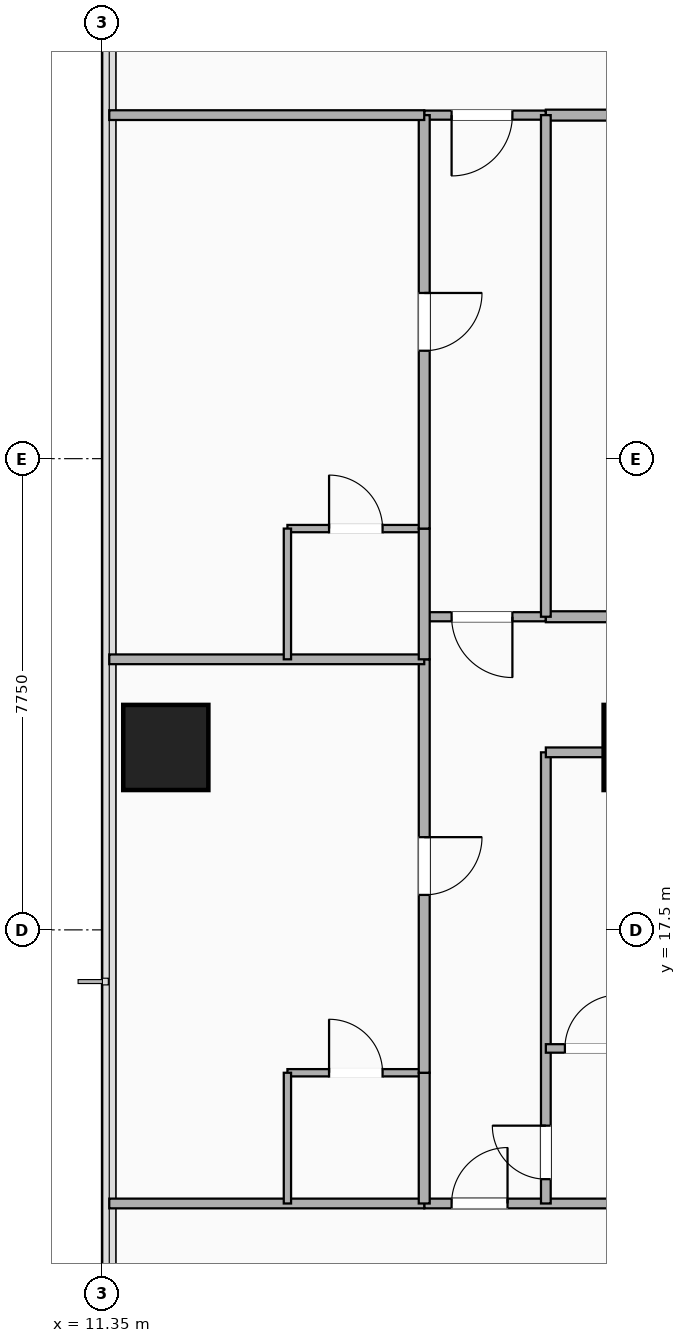
"""IFC4 building model, lengths in metres.
Left out: names, types, materials, properties, quantities, classifications, styles, units other than length and angle.
Written with IfcOpenShell. Run it as: python <this file> out.ifc"""

import sys

from ifc_helpers import new_model, si_unit, direction, frame, frame_2d, origin, origin_2d, place, context, subcontext, project, spatial, rectangle, extrude, element, fill, save


model = new_model("IFC4")
c1 = context("Model", 3, precision=1e-05, world=origin(), true_north=direction((0.0, 1.0)))
c2 = subcontext(c1, "Body", "Model", "MODEL_VIEW")
j1 = project(units=[si_unit("LENGTHUNIT", "METRE"), si_unit("PLANEANGLEUNIT", "RADIAN")], contexts=[c1])
p1 = place(None, origin())
s1 = spatial("IfcSite", under=j1, at=p1, CompositionType="ELEMENT")
p2 = place(p1, origin())
s2 = spatial("IfcBuilding", under=s1, at=p2, CompositionType="ELEMENT")
p3 = place(p2, frame((0.0, 0.0, 50.9)))
s3 = spatial("IfcBuildingStorey", under=s2, at=p3, CompositionType="ELEMENT", Elevation=50.9)
for number, where, z_axis, x_axis in (
    (1, (20.3, 20.5, -0.28), (0.0, 0.0, 1.0), (1.0, 0.0, 0.0)),
    (2, (12.4, 20.5, -0.28), (0.0, 0.0, 1.0), (1.0, 0.0, 0.0)),
):
    element("IfcColumn", number, at=place(p3, frame(where, z_axis=z_axis, x_axis=x_axis)), inside=s3, PredefinedType="COLUMN", context=c2, shape_type="SweptSolid", body=[
        extrude(rectangle(XDim=1.4, YDim=1.4, at=origin_2d()), origin(), (0.0, 0.0, 1.0), 3.5),
    ])
p4 = place(p3, frame((16.65, 13.0, 0.0), z_axis=(0.0, 0.0, 1.0), x_axis=(1.0, 0.0, 0.0)))
e3 = element("IfcWall", 3, at=p4, inside=s3, PredefinedType="PARTITIONING", context=c2, shape_type="SweptSolid", body=[
    extrude(rectangle(XDim=3.65, YDim=0.16, at=frame_2d((1.825, 0.0))), origin(), (0.0, 0.0, 1.0), 2.51),
])
p5 = place(p4, frame((1.37, 0.0, 0.0), z_axis=(0.0, 0.0, 1.0), x_axis=(-1.0, 0.0, 0.0)))
e4 = element("IfcOpeningElement", 4, at=p5, cuts=e3, PredefinedType="OPENING", context=c2, shape_type="SweptSolid", body=[
    extrude(rectangle(XDim=0.92, YDim=2.08, at=frame_2d((0.46, 1.04))), frame((0.0, 0.09, 0.0), z_axis=(0.0, -1.0, 0.0), x_axis=(1.0, 0.0, 0.0)), (0.0, 0.0, 1.0), 0.18),
])
p6 = place(p3, frame((18.65, 13.0, 0.0), z_axis=(0.0, 0.0, 1.0), x_axis=(0.0, 1.0, 0.0)))
e5 = element("IfcWall", 5, at=p6, inside=s3, PredefinedType="PARTITIONING", context=c2, shape_type="SweptSolid", body=[
    extrude(rectangle(XDim=7.42, YDim=0.16, at=frame_2d((3.71, 0.0))), origin(), (0.0, 0.0, 1.0), 2.51),
])
p7 = place(p6, frame((1.28, 0.0, 0.0), z_axis=(0.0, 0.0, 1.0), x_axis=(-1.0, 0.0, 0.0)))
e6 = element("IfcOpeningElement", 6, at=p7, cuts=e5, PredefinedType="OPENING", context=c2, shape_type="SweptSolid", body=[
    extrude(rectangle(XDim=0.88, YDim=2.08, at=frame_2d((0.44, 1.04))), frame((0.0, 0.09, 0.0), z_axis=(0.0, -1.0, 0.0), x_axis=(1.0, 0.0, 0.0)), (0.0, 0.0, 1.0), 0.18),
])
p8 = place(p3, frame((18.65, 20.42, 0.0), z_axis=(0.0, 0.0, 1.0), x_axis=(1.0, 0.0, 0.0)))
e7 = element("IfcWall", 7, at=p8, inside=s3, PredefinedType="PARTITIONING", context=c2, shape_type="SweptSolid", body=[
    extrude(rectangle(XDim=1.65, YDim=0.16, at=frame_2d((0.825, 0.0))), origin(), (0.0, 0.0, 1.0), 2.51),
])
p9 = place(p3, frame((16.65, 22.65, 0.0), z_axis=(0.0, 0.0, 1.0), x_axis=(1.0, 0.0, 0.0)))
e8 = element("IfcWall", 8, at=p9, inside=s3, PredefinedType="PARTITIONING", context=c2, shape_type="SweptSolid", body=[
    extrude(rectangle(XDim=2.0, YDim=0.15, at=frame_2d((1.0, 0.0))), origin(), (0.0, 0.0, 1.0), 3.22),
])
p10 = place(p9, frame((0.45, 0.0, 0.0)))
e9 = element("IfcOpeningElement", 9, at=p10, cuts=e8, PredefinedType="OPENING", context=c2, shape_type="SweptSolid", body=[
    extrude(rectangle(XDim=1.0, YDim=2.15, at=frame_2d((0.5, 1.075))), frame((0.0, 0.085, 0.0), z_axis=(0.0, -1.0, 0.0), x_axis=(1.0, 0.0, 0.0)), (0.0, 0.0, 1.0), 0.17),
])
p11 = place(p3, frame((16.65, 30.9, 0.0), z_axis=(0.0, 0.0, 1.0), x_axis=(1.0, 0.0, 0.0)))
e10 = element("IfcWall", 10, at=p11, inside=s3, PredefinedType="PARTITIONING", context=c2, shape_type="SweptSolid", body=[
    extrude(rectangle(XDim=2.0, YDim=0.15, at=frame_2d((1.0, 0.0))), origin(), (0.0, 0.0, 1.0), 3.22),
])
p12 = place(p11, frame((0.45, 0.0, 0.0)))
e11 = element("IfcOpeningElement", 11, at=p12, cuts=e10, PredefinedType="OPENING", context=c2, shape_type="SweptSolid", body=[
    extrude(rectangle(XDim=1.0, YDim=2.15, at=frame_2d((0.5, 1.075))), frame((0.0, 0.085, 0.0), z_axis=(0.0, -1.0, 0.0), x_axis=(1.0, 0.0, 0.0)), (0.0, 0.0, 1.0), 0.17),
])
p13 = place(p3, frame((18.65, 22.65, 0.0), z_axis=(0.0, 0.0, 1.0), x_axis=(1.0, 0.0, 0.0)))
e12 = element("IfcWall", 12, at=p13, inside=s3, PredefinedType="PARTITIONING", context=c2, shape_type="SweptSolid", body=[
    extrude(rectangle(XDim=10.55, YDim=0.18, at=frame_2d((5.275, 0.0))), origin(), (0.0, 0.0, 1.0), 2.51),
])
p14 = place(p13, frame((4.8, 0.0, 0.0)))
e13 = element("IfcOpeningElement", 13, at=p14, cuts=e12, PredefinedType="OPENING", context=c2, shape_type="SweptSolid", body=[
    extrude(rectangle(XDim=0.95, YDim=2.15, at=frame_2d((0.475, 1.075))), frame((0.0, 0.1, 0.0), z_axis=(0.0, -1.0, 0.0), x_axis=(1.0, 0.0, 0.0)), (0.0, 0.0, 1.0), 0.2),
])
p15 = place(p3, frame((18.65, 30.9, 0.0), z_axis=(0.0, 0.0, 1.0), x_axis=(1.0, 0.0, 0.0)))
e14 = element("IfcWall", 14, at=p15, inside=s3, PredefinedType="PARTITIONING", context=c2, shape_type="SweptSolid", body=[
    extrude(rectangle(XDim=10.55, YDim=0.18, at=frame_2d((5.275, 0.0))), origin(), (0.0, 0.0, 1.0), 2.51),
])
p16 = place(p3, frame((18.65, 22.65, 0.0), z_axis=(0.0, 0.0, 1.0), x_axis=(0.0, 1.0, 0.0)))
e15 = element("IfcWall", 15, at=p16, inside=s3, PredefinedType="PARTITIONING", context=c2, shape_type="SweptSolid", body=[
    extrude(rectangle(XDim=8.25, YDim=0.16, at=frame_2d((4.125, 0.0))), origin(), (0.0, 0.0, 1.0), 2.788),
])
p17 = place(p3, frame((11.47, 13.0, 0.0), z_axis=(0.0, 0.0, 1.0), x_axis=(1.0, 0.0, 0.0)))
e16 = element("IfcWall", 16, at=p17, inside=s3, PredefinedType="PARTITIONING", context=c2, shape_type="SweptSolid", body=[
    extrude(rectangle(XDim=5.18, YDim=0.16, at=frame_2d((2.59, 0.0))), origin(), (0.0, 0.0, 1.0), 2.583),
])
p18 = place(p3, frame((14.4, 15.15, 0.0), z_axis=(0.0, 0.0, 1.0), x_axis=(1.0, 0.0, 0.0)))
e17 = element("IfcWall", 17, at=p18, inside=s3, PredefinedType="PARTITIONING", context=c2, shape_type="SweptSolid", body=[
    extrude(rectangle(XDim=2.25, YDim=0.12, at=frame_2d((1.125, 0.0))), origin(), (0.0, 0.0, 1.0), 3.22),
])
p19 = place(p18, frame((1.565, 0.0, 0.0), z_axis=(0.0, 0.0, 1.0), x_axis=(-1.0, 0.0, 0.0)))
e18 = element("IfcOpeningElement", 18, at=p19, cuts=e17, PredefinedType="OPENING", context=c2, shape_type="SweptSolid", body=[
    extrude(rectangle(XDim=0.88, YDim=2.08, at=frame_2d((0.44, 1.04))), frame((0.0, 0.07, 0.0), z_axis=(0.0, -1.0, 0.0), x_axis=(1.0, 0.0, 0.0)), (0.0, 0.0, 1.0), 0.14),
])
p20 = place(p3, frame((14.4, 13.0, 0.0), z_axis=(0.0, 0.0, 1.0), x_axis=(0.0, 1.0, 0.0)))
e19 = element("IfcWall", 19, at=p20, inside=s3, PredefinedType="PARTITIONING", context=c2, shape_type="SweptSolid", body=[
    extrude(rectangle(XDim=2.15, YDim=0.12, at=frame_2d((1.075, 0.0))), origin(), (0.0, 0.0, 1.0), 2.902),
])
p21 = place(p3, frame((16.65, 13.0, 0.0), z_axis=(0.0, 0.0, 1.0), x_axis=(0.0, 1.0, 0.0)))
e20 = element("IfcWall", 20, at=p21, inside=s3, PredefinedType="PARTITIONING", context=c2, shape_type="SweptSolid", body=[
    extrude(rectangle(XDim=2.15, YDim=0.18, at=frame_2d((1.075, 0.0))), origin(), (0.0, 0.0, 1.0), 2.902),
])
p22 = place(p3, frame((16.65, 15.15, 0.0), z_axis=(0.0, 0.0, 1.0), x_axis=(0.0, 1.0, 0.0)))
e21 = element("IfcWall", 21, at=p22, inside=s3, PredefinedType="PARTITIONING", context=c2, shape_type="SweptSolid", body=[
    extrude(rectangle(XDim=6.8, YDim=0.18, at=frame_2d((3.4, 0.0))), origin(), (0.0, 0.0, 1.0), 2.51),
])
p23 = place(p22, frame((2.925, 0.0, 0.0)))
e22 = element("IfcOpeningElement", 22, at=p23, cuts=e21, PredefinedType="OPENING", context=c2, shape_type="SweptSolid", body=[
    extrude(rectangle(XDim=0.95, YDim=2.15, at=frame_2d((0.475, 1.075))), frame((0.0, 0.1, 0.0), z_axis=(0.0, -1.0, 0.0), x_axis=(1.0, 0.0, 0.0)), (0.0, 0.0, 1.0), 0.2),
])
p24 = place(p3, frame((11.47, 21.95, 0.0), z_axis=(0.0, 0.0, 1.0), x_axis=(1.0, 0.0, 0.0)))
e23 = element("IfcWall", 23, at=p24, inside=s3, PredefinedType="PARTITIONING", context=c2, shape_type="SweptSolid", body=[
    extrude(rectangle(XDim=5.18, YDim=0.16, at=frame_2d((2.59, 0.0))), origin(), (0.0, 0.0, 1.0), 2.583),
])
p25 = place(p3, frame((14.4, 24.1, 0.0), z_axis=(0.0, 0.0, 1.0), x_axis=(1.0, 0.0, 0.0)))
e24 = element("IfcWall", 24, at=p25, inside=s3, PredefinedType="PARTITIONING", context=c2, shape_type="SweptSolid", body=[
    extrude(rectangle(XDim=2.25, YDim=0.12, at=frame_2d((1.125, 0.0))), origin(), (0.0, 0.0, 1.0), 3.22),
])
p26 = place(p25, frame((1.565, 0.0, 0.0), z_axis=(0.0, 0.0, 1.0), x_axis=(-1.0, 0.0, 0.0)))
e25 = element("IfcOpeningElement", 25, at=p26, cuts=e24, PredefinedType="OPENING", context=c2, shape_type="SweptSolid", body=[
    extrude(rectangle(XDim=0.88, YDim=2.08, at=frame_2d((0.44, 1.04))), frame((0.0, 0.07, 0.0), z_axis=(0.0, -1.0, 0.0), x_axis=(1.0, 0.0, 0.0)), (0.0, 0.0, 1.0), 0.14),
])
p27 = place(p3, frame((14.4, 21.95, 0.0), z_axis=(0.0, 0.0, 1.0), x_axis=(0.0, 1.0, 0.0)))
e26 = element("IfcWall", 26, at=p27, inside=s3, PredefinedType="PARTITIONING", context=c2, shape_type="SweptSolid", body=[
    extrude(rectangle(XDim=2.15, YDim=0.12, at=frame_2d((1.075, 0.0))), origin(), (0.0, 0.0, 1.0), 3.22),
])
p28 = place(p3, frame((16.65, 21.95, 0.0), z_axis=(0.0, 0.0, 1.0), x_axis=(0.0, 1.0, 0.0)))
e27 = element("IfcWall", 27, at=p28, inside=s3, PredefinedType="PARTITIONING", context=c2, shape_type="SweptSolid", body=[
    extrude(rectangle(XDim=2.15, YDim=0.18, at=frame_2d((1.075, 0.0))), origin(), (0.0, 0.0, 1.0), 3.22),
])
p29 = place(p3, frame((16.65, 24.1, 0.0), z_axis=(0.0, 0.0, 1.0), x_axis=(0.0, 1.0, 0.0)))
e28 = element("IfcWall", 28, at=p29, inside=s3, PredefinedType="PARTITIONING", context=c2, shape_type="SweptSolid", body=[
    extrude(rectangle(XDim=6.8, YDim=0.18, at=frame_2d((3.4, 0.0))), origin(), (0.0, 0.0, 1.0), 2.788),
])
p30 = place(p29, frame((2.925, 0.0, 0.0)))
e29 = element("IfcOpeningElement", 29, at=p30, cuts=e28, PredefinedType="OPENING", context=c2, shape_type="SweptSolid", body=[
    extrude(rectangle(XDim=0.95, YDim=2.15, at=frame_2d((0.475, 1.075))), frame((0.0, 0.1, 0.0), z_axis=(0.0, -1.0, 0.0), x_axis=(1.0, 0.0, 0.0)), (0.0, 0.0, 1.0), 0.2),
])
p31 = place(p3, frame((11.47, 30.9, 0.0), z_axis=(0.0, 0.0, 1.0), x_axis=(1.0, 0.0, 0.0)))
e30 = element("IfcWall", 30, at=p31, inside=s3, PredefinedType="PARTITIONING", context=c2, shape_type="SweptSolid", body=[
    extrude(rectangle(XDim=5.18, YDim=0.16, at=frame_2d((2.59, 0.0))), origin(), (0.0, 0.0, 1.0), 2.583),
])
p32 = place(p3, frame((18.65, 15.55, 0.0), z_axis=(0.0, 0.0, 1.0), x_axis=(1.0, 0.0, 0.0)))
e31 = element("IfcWall", 31, at=p32, inside=s3, PredefinedType="PARTITIONING", context=c2, shape_type="SweptSolid", body=[
    extrude(rectangle(XDim=1.6, YDim=0.14, at=frame_2d((0.8, 0.0))), origin(), (0.0, 0.0, 1.0), 2.51),
])
p33 = place(p32, frame((1.193, 0.0, 0.0), z_axis=(0.0, 0.0, 1.0), x_axis=(-1.0, 0.0, 0.0)))
e32 = element("IfcOpeningElement", 32, at=p33, cuts=e31, PredefinedType="OPENING", context=c2, shape_type="SweptSolid", body=[
    extrude(rectangle(XDim=0.88, YDim=2.08, at=frame_2d((0.44, 1.04))), frame((0.0, 0.08, 0.0), z_axis=(0.0, -1.0, 0.0), x_axis=(1.0, 0.0, 0.0)), (0.0, 0.0, 1.0), 0.16),
])
p34 = place(p5, origin())
e33 = element("IfcDoor", 33, at=p34, inside=s3, OperationType="SINGLE_SWING_RIGHT", PredefinedType="DOOR", context=c2, shape_type="SweptSolid", body=[
    extrude(rectangle(XDim=0.92, YDim=2.08, at=frame_2d((0.46, 1.04))), frame((0.0, 0.025, 0.0), z_axis=(0.0, -1.0, 0.0), x_axis=(1.0, 0.0, 0.0)), (0.0, 0.0, 1.0), 0.05),
])
fill(e4, e33)
p35 = place(p7, origin())
e34 = element("IfcDoor", 34, at=p35, inside=s3, OperationType="SINGLE_SWING_RIGHT", PredefinedType="DOOR", context=c2, shape_type="SweptSolid", body=[
    extrude(rectangle(XDim=0.88, YDim=2.08, at=frame_2d((0.44, 1.04))), frame((0.0, 0.025, 0.0), z_axis=(0.0, -1.0, 0.0), x_axis=(1.0, 0.0, 0.0)), (0.0, 0.0, 1.0), 0.05),
])
fill(e6, e34)
p36 = place(p10, origin())
e35 = element("IfcDoor", 35, at=p36, inside=s3, OperationType="SINGLE_SWING_RIGHT", PredefinedType="DOOR", context=c2, shape_type="SweptSolid", body=[
    extrude(rectangle(XDim=1.0, YDim=2.15, at=frame_2d((0.5, 1.075))), frame((0.0, 0.025, 0.0), z_axis=(0.0, -1.0, 0.0), x_axis=(1.0, 0.0, 0.0)), (0.0, 0.0, 1.0), 0.05),
])
fill(e9, e35)
p37 = place(p12, origin())
e36 = element("IfcDoor", 36, at=p37, inside=s3, OperationType="SINGLE_SWING_LEFT", PredefinedType="DOOR", context=c2, shape_type="SweptSolid", body=[
    extrude(rectangle(XDim=1.0, YDim=2.15, at=frame_2d((0.5, 1.075))), frame((0.0, 0.025, 0.0), z_axis=(0.0, -1.0, 0.0), x_axis=(1.0, 0.0, 0.0)), (0.0, 0.0, 1.0), 0.05),
])
fill(e11, e36)
p38 = place(p19, origin())
e37 = element("IfcDoor", 37, at=p38, inside=s3, OperationType="SINGLE_SWING_LEFT", PredefinedType="DOOR", context=c2, shape_type="SweptSolid", body=[
    extrude(rectangle(XDim=0.88, YDim=2.08, at=frame_2d((0.44, 1.04))), frame((0.0, 0.025, 0.0), z_axis=(0.0, -1.0, 0.0), x_axis=(1.0, 0.0, 0.0)), (0.0, 0.0, 1.0), 0.05),
])
fill(e18, e37)
p39 = place(p23, origin())
e38 = element("IfcDoor", 38, at=p39, inside=s3, OperationType="SINGLE_SWING_RIGHT", PredefinedType="DOOR", context=c2, shape_type="SweptSolid", body=[
    extrude(rectangle(XDim=0.95, YDim=2.15, at=frame_2d((0.475, 1.075))), frame((0.0, 0.025, 0.0), z_axis=(0.0, -1.0, 0.0), x_axis=(1.0, 0.0, 0.0)), (0.0, 0.0, 1.0), 0.05),
])
fill(e22, e38)
p40 = place(p26, origin())
e39 = element("IfcDoor", 39, at=p40, inside=s3, OperationType="SINGLE_SWING_LEFT", PredefinedType="DOOR", context=c2, shape_type="SweptSolid", body=[
    extrude(rectangle(XDim=0.88, YDim=2.08, at=frame_2d((0.44, 1.04))), frame((0.0, 0.025, 0.0), z_axis=(0.0, -1.0, 0.0), x_axis=(1.0, 0.0, 0.0)), (0.0, 0.0, 1.0), 0.05),
])
fill(e25, e39)
p41 = place(p30, origin())
e40 = element("IfcDoor", 40, at=p41, inside=s3, OperationType="SINGLE_SWING_RIGHT", PredefinedType="DOOR", context=c2, shape_type="SweptSolid", body=[
    extrude(rectangle(XDim=0.95, YDim=2.15, at=frame_2d((0.475, 1.075))), frame((0.0, 0.025, 0.0), z_axis=(0.0, -1.0, 0.0), x_axis=(1.0, 0.0, 0.0)), (0.0, 0.0, 1.0), 0.05),
])
fill(e29, e40)
p42 = place(p33, origin())
e41 = element("IfcDoor", 41, at=p42, inside=s3, OperationType="SINGLE_SWING_RIGHT", PredefinedType="DOOR", context=c2, shape_type="SweptSolid", body=[
    extrude(rectangle(XDim=0.88, YDim=2.08, at=frame_2d((0.44, 1.04))), frame((0.0, 0.025, 0.0), z_axis=(0.0, -1.0, 0.0), x_axis=(1.0, 0.0, 0.0)), (0.0, 0.0, 1.0), 0.05),
])
fill(e32, e41)
save(model, sys.argv[1])
